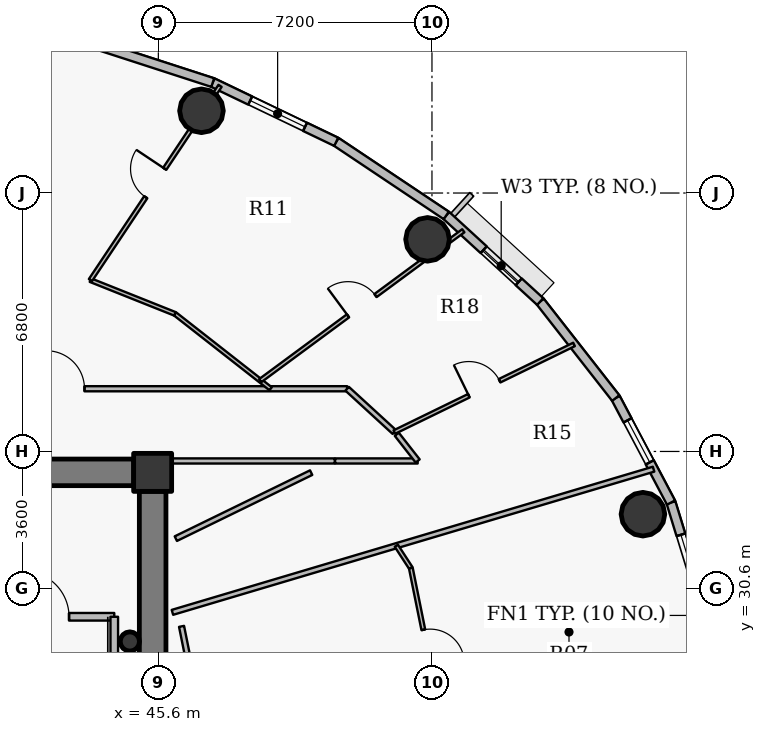
"""IFC4 building model, lengths in metres.
Left out: names, types, materials, properties, quantities, classifications, styles, units other than length and angle.
Written with IfcOpenShell. Run it as: python <this file> out.ifc"""

import sys

from ifc_helpers import new_model, si_unit, direction, frame, frame_2d, origin, origin_2d, place, context, subcontext, project, spatial, rectangle, hollow_circle, extrude, source, transform, mapped, element, fill, save


model = new_model("IFC4")
c1 = context("Model", 3, precision=1e-05, world=origin(), true_north=direction((0.0, 1.0)))
c2 = subcontext(c1, "Body", "Model", "MODEL_VIEW")
j1 = project(units=[si_unit("LENGTHUNIT", "METRE"), si_unit("PLANEANGLEUNIT", "RADIAN")], contexts=[c1])
p1 = place(None, origin())
s1 = spatial("IfcSite", under=j1, at=p1, CompositionType="ELEMENT")
p2 = place(p1, origin())
s2 = spatial("IfcBuilding", under=s1, at=p2, CompositionType="ELEMENT")
p3 = place(p2, frame((0.0, 0.0, 240.3)))
s3 = spatial("IfcBuildingStorey", under=s2, at=p3, CompositionType="ELEMENT", Elevation=240.3)
p4 = place(p3, frame((45.45, 33.65, 0.0), z_axis=(0.0, 0.0, 1.0), x_axis=(1.0, 0.0, 0.0)))
e1 = element("IfcColumn", 1, at=p4, inside=s3, PredefinedType="COLUMN", context=c2, shape_type="SweptSolid", body=[
    extrude(rectangle(XDim=1.0, YDim=1.0, at=origin_2d()), origin(), (0.0, 0.0, 1.0), 3.75),
])
p5 = place(p3, frame((27.05, 33.65, 0.0), z_axis=(0.0, 0.0, 1.0), x_axis=(1.0, 0.0, 0.0)))
e2 = element("IfcWall", 2, at=p5, inside=s3, PredefinedType="SHEAR", context=c2, shape_type="SweptSolid", body=[
    extrude(rectangle(XDim=17.9, YDim=0.7, at=frame_2d((8.95, 0.0))), origin(), (0.0, 0.0, 1.0), 3.05),
])
p6 = place(p5, frame((13.675, 0.0, 0.0)))
e3 = element("IfcOpeningElement", 3, at=p6, cuts=e2, PredefinedType="OPENING", context=c2, shape_type="SweptSolid", body=[
    extrude(rectangle(XDim=1.15, YDim=2.15, at=origin_2d()), frame((0.575, 0.36, 1.075), z_axis=(0.0, -1.0, 0.0), x_axis=(1.0, 0.0, 0.0)), (0.0, 0.0, 1.0), 0.72),
])
p7 = place(p3, frame((45.45, 33.15, 0.0), z_axis=(0.0, 0.0, 1.0), x_axis=(0.0, -1.0, 0.0)))
e4 = element("IfcWall", 4, at=p7, inside=s3, PredefinedType="SHEAR", context=c2, shape_type="SweptSolid", body=[
    extrude(rectangle(XDim=12.3, YDim=0.7, at=frame_2d((6.15, 0.0))), origin(), (0.0, 0.0, 1.0), 3.05),
])
for number, where, z_axis, x_axis in (
    (5, (58.351, 32.549, 0.0), (0.0, 0.0, 1.0), (1.0, 0.0, 0.0)),
    (6, (52.683, 39.781, 0.0), (0.0, 0.0, 1.0), (1.0, 0.0, 0.0)),
    (7, (46.735, 43.164, 0.0), (0.0, 0.0, 1.0), (1.0, 0.0, 0.0)),
):
    element("IfcColumn", number, at=place(p3, frame(where, z_axis=z_axis, x_axis=x_axis)), inside=s3, PredefinedType="COLUMN", context=c2, shape_type="SweptSolid", body=[
        extrude(hollow_circle(Radius=0.575, WallThickness=0.036, at=origin_2d()), origin(), (0.0, 0.0, 1.0), 3.75),
    ])
p8 = place(p3, frame((44.85, 29.2, 0.0), z_axis=(0.0, 0.0, 1.0), x_axis=(1.0, 0.0, 0.0)))
e8 = element("IfcColumn", 8, at=p8, inside=s3, PredefinedType="COLUMN", context=c2, shape_type="SweptSolid", body=[
    extrude(hollow_circle(Radius=0.254, WallThickness=0.02, at=origin_2d()), origin(), (0.0, 0.0, 1.0), 3.75),
])
p9 = place(p3, frame((59.09, 32.856, 0.0), z_axis=(0.0, 0.0, 1.0), x_axis=(0.293132907334, -0.95607170162, 0.0)))
e9 = element("IfcWall", 9, at=p9, inside=s3, PredefinedType="SOLIDWALL", context=c2, shape_type="SweptSolid", body=[
    extrude(rectangle(XDim=3.025, YDim=0.24, at=frame_2d((1.512, 0.0))), origin(), (0.0, 0.0, 1.0), 3.5),
])
p10 = place(p9, frame((0.887, 0.0, 0.9)))
e10 = element("IfcOpeningElement", 10, at=p10, cuts=e9, PredefinedType="OPENING", context=c2, shape_type="SweptSolid", body=[
    extrude(rectangle(XDim=1.25, YDim=1.65, at=origin_2d()), frame((0.625, 0.13, 0.825), z_axis=(0.0, -1.0, 0.0), x_axis=(1.0, 0.0, 0.0)), (0.0, 0.0, 1.0), 0.26),
])
p11 = place(p3, frame((57.636, 35.605, 0.0), z_axis=(0.0, 0.0, 1.0), x_axis=(0.46766049993, -0.883908172157, 0.0)))
e11 = element("IfcWall", 11, at=p11, inside=s3, PredefinedType="SOLIDWALL", context=c2, shape_type="SweptSolid", body=[
    extrude(rectangle(XDim=3.11, YDim=0.24, at=frame_2d((1.555, 0.0))), origin(), (0.0, 0.0, 1.0), 3.5),
])
p12 = place(p11, frame((0.664, 0.0, 0.9)))
e12 = element("IfcOpeningElement", 12, at=p12, cuts=e11, PredefinedType="OPENING", context=c2, shape_type="SweptSolid", body=[
    extrude(rectangle(XDim=1.25, YDim=1.65, at=origin_2d()), frame((0.625, 0.13, 0.825), z_axis=(0.0, -1.0, 0.0), x_axis=(1.0, 0.0, 0.0)), (0.0, 0.0, 1.0), 0.26),
])
p13 = place(p3, frame((55.648, 38.145, 0.0), z_axis=(0.0, 0.0, 1.0), x_axis=(0.616312344705, -0.787501805562, 0.0)))
e13 = element("IfcWall", 13, at=p13, inside=s3, PredefinedType="SOLIDWALL", context=c2, shape_type="SweptSolid", body=[
    extrude(rectangle(XDim=3.225, YDim=0.24, at=frame_2d((1.612, 0.0))), origin(), (0.0, 0.0, 1.0), 3.5),
])
p14 = place(p3, frame((53.176, 40.411, 0.0), z_axis=(0.0, 0.0, 1.0), x_axis=(0.737123922599, -0.675757591694, 0.0)))
e14 = element("IfcWall", 14, at=p14, inside=s3, PredefinedType="SOLIDWALL", context=c2, shape_type="SweptSolid", body=[
    extrude(rectangle(XDim=3.354, YDim=0.24, at=frame_2d((1.677, 0.0))), origin(), (0.0, 0.0, 1.0), 3.5),
])
p15 = place(p14, frame((1.336, 0.0, 0.9)))
e15 = element("IfcOpeningElement", 15, at=p15, cuts=e14, PredefinedType="OPENING", context=c2, shape_type="SweptSolid", body=[
    extrude(rectangle(XDim=1.25, YDim=1.65, at=origin_2d()), frame((0.625, 0.13, 0.825), z_axis=(0.0, -1.0, 0.0), x_axis=(1.0, 0.0, 0.0)), (0.0, 0.0, 1.0), 0.26),
])
p16 = place(p3, frame((50.28, 42.348, 0.0), z_axis=(0.0, 0.0, 1.0), x_axis=(0.831262496074, -0.555880079352, 0.0)))
e16 = element("IfcWall", 16, at=p16, inside=s3, PredefinedType="SOLIDWALL", context=c2, shape_type="SweptSolid", body=[
    extrude(rectangle(XDim=3.484, YDim=0.24, at=frame_2d((1.742, 0.0))), origin(), (0.0, 0.0, 1.0), 3.5),
])
p17 = place(p3, frame((47.031, 43.906, 0.0), z_axis=(0.0, 0.0, 1.0), x_axis=(0.901598104751, -0.432574684313, 0.0)))
e17 = element("IfcWall", 17, at=p17, inside=s3, PredefinedType="SOLIDWALL", context=c2, shape_type="SweptSolid", body=[
    extrude(rectangle(XDim=3.604, YDim=0.24, at=frame_2d((1.802, 0.0))), origin(), (0.0, 0.0, 1.0), 3.5),
])
p18 = place(p17, frame((1.094, 0.0, 0.9)))
e18 = element("IfcOpeningElement", 18, at=p18, cuts=e17, PredefinedType="OPENING", context=c2, shape_type="SweptSolid", body=[
    extrude(rectangle(XDim=1.6, YDim=1.75, at=origin_2d()), frame((0.8, 0.13, 0.875), z_axis=(0.0, -1.0, 0.0), x_axis=(1.0, 0.0, 0.0)), (0.0, 0.0, 1.0), 0.26),
])
p19 = place(p3, frame((43.509, 45.049, 0.0), z_axis=(0.0, 0.0, 1.0), x_axis=(0.951210789182, -0.308541787354, 0.0)))
e19 = element("IfcWall", 19, at=p19, inside=s3, PredefinedType="SOLIDWALL", context=c2, shape_type="SweptSolid", body=[
    extrude(rectangle(XDim=3.702, YDim=0.24, at=frame_2d((1.851, 0.0))), origin(), (0.0, 0.0, 1.0), 3.5),
])
p20 = place(p3, frame((24.35, 35.85, 0.0), z_axis=(0.0, 0.0, 1.0), x_axis=(1.0, 0.0, 0.0)))
e20 = element("IfcWall", 20, at=p20, inside=s3, PredefinedType="PARTITIONING", context=c2, shape_type="SweptSolid", body=[
    extrude(rectangle(XDim=26.218, YDim=0.135, at=frame_2d((13.109, 0.0))), origin(), (0.0, 0.0, 1.0), 2.935),
])
p21 = place(p20, frame((3.172, 0.0, 0.0)))
e21 = element("IfcOpeningElement", 21, at=p21, cuts=e20, PredefinedType="OPENING", context=c2, shape_type="SweptSolid", body=[
    extrude(rectangle(XDim=1.0, YDim=2.15, at=origin_2d()), frame((0.5, 0.078, 1.075), z_axis=(0.0, -1.0, 0.0), x_axis=(1.0, 0.0, 0.0)), (0.0, 0.0, 1.0), 0.155),
])
p22 = place(p20, frame((18.306, 0.0, 0.0)))
e22 = element("IfcOpeningElement", 22, at=p22, cuts=e20, PredefinedType="OPENING", context=c2, shape_type="SweptSolid", body=[
    extrude(rectangle(XDim=1.0, YDim=2.15, at=origin_2d()), frame((0.5, 0.078, 1.075), z_axis=(0.0, -1.0, 0.0), x_axis=(1.0, 0.0, 0.0)), (0.0, 0.0, 1.0), 0.155),
])
p23 = place(p3, frame((35.95, 29.85, 0.0), z_axis=(0.0, 0.0, 1.0), x_axis=(1.0, 0.0, 0.0)))
e23 = element("IfcWall", 23, at=p23, inside=s3, PredefinedType="PARTITIONING", context=c2, shape_type="SweptSolid", body=[
    extrude(rectangle(XDim=8.49, YDim=0.2, at=frame_2d((4.245, 0.0))), origin(), (0.0, 0.0, 1.0), 3.085),
])
p24 = place(p23, frame((6.1, 0.0, 0.0)))
e24 = element("IfcOpeningElement", 24, at=p24, cuts=e23, PredefinedType="OPENING", context=c2, shape_type="SweptSolid", body=[
    extrude(rectangle(XDim=1.2, YDim=2.15, at=origin_2d()), frame((0.6, 0.11, 1.075), z_axis=(0.0, -1.0, 0.0), x_axis=(1.0, 0.0, 0.0)), (0.0, 0.0, 1.0), 0.22),
])
p25 = place(p23, frame((0.37, 0.0, 0.0)))
e25 = element("IfcOpeningElement", 25, at=p25, cuts=e23, PredefinedType="OPENING", context=c2, shape_type="SweptSolid", body=[
    extrude(rectangle(XDim=1.15, YDim=2.15, at=origin_2d()), frame((0.575, 0.11, 1.075), z_axis=(0.0, -1.0, 0.0), x_axis=(1.0, 0.0, 0.0)), (0.0, 0.0, 1.0), 0.22),
])
p26 = place(p23, frame((2.425, 0.0, 0.0)))
e26 = element("IfcOpeningElement", 26, at=p26, cuts=e23, PredefinedType="OPENING", context=c2, shape_type="SweptSolid", body=[
    extrude(rectangle(XDim=1.05, YDim=2.15, at=origin_2d()), frame((0.525, 0.11, 1.075), z_axis=(0.0, -1.0, 0.0), x_axis=(1.0, 0.0, 0.0)), (0.0, 0.0, 1.0), 0.22),
])
p27 = place(p3, frame((43.812, 38.708, 0.0), z_axis=(0.0, 0.0, 1.0), x_axis=(0.928806399166, -0.370565342239, 0.0)))
e27 = element("IfcWall", 27, at=p27, inside=s3, PredefinedType="PARTITIONING", context=c2, shape_type="SweptSolid", body=[
    extrude(rectangle(XDim=2.397, YDim=0.1, at=frame_2d((1.199, 0.0))), origin(), (0.0, 0.0, 1.0), 2.935),
])
p28 = place(p3, frame((43.812, 38.708, 0.0), z_axis=(0.0, 0.0, 1.0), x_axis=(0.555094340213, 0.831787396793, 0.0)))
e28 = element("IfcWall", 28, at=p28, inside=s3, PredefinedType="PARTITIONING", context=c2, shape_type="SweptSolid", body=[
    extrude(rectangle(XDim=6.146, YDim=0.1, at=frame_2d((3.073, 0.0))), origin(), (0.0, 0.0, 1.0), 2.935),
])
p29 = place(p28, frame((2.623, 0.0, 0.0)))
e29 = element("IfcOpeningElement", 29, at=p29, cuts=e28, PredefinedType="OPENING", context=c2, shape_type="SweptSolid", body=[
    extrude(rectangle(XDim=0.9, YDim=2.1, at=origin_2d()), frame((0.45, 0.06, 1.05), z_axis=(0.0, -1.0, 0.0), x_axis=(1.0, 0.0, 0.0)), (0.0, 0.0, 1.0), 0.12),
])
p30 = place(p3, frame((44.44, 21.33, 0.0), z_axis=(0.0, 0.0, 1.0), x_axis=(0.0, 1.0, 0.0)))
e30 = element("IfcWall", 30, at=p30, inside=s3, PredefinedType="PARTITIONING", context=c2, shape_type="SweptSolid", body=[
    extrude(rectangle(XDim=8.52, YDim=0.2, at=frame_2d((4.26, 0.0))), origin(), (0.0, 0.0, 1.0), 3.5),
])
p31 = place(p3, frame((45.97, 29.967, 0.0), z_axis=(0.0, 0.0, 1.0), x_axis=(0.958474934199, 0.285176788174, 0.0)))
e31 = element("IfcWall", 31, at=p31, inside=s3, PredefinedType="PARTITIONING", context=c2, shape_type="SweptSolid", body=[
    extrude(rectangle(XDim=13.21, YDim=0.135, at=frame_2d((6.605, 0.0))), origin(), (0.0, 0.0, 1.0), 2.985),
])
p32 = place(p3, frame((46.039, 37.819, 0.0), z_axis=(0.0, 0.0, 1.0), x_axis=(0.787364681479, -0.616487516791, 0.0)))
e32 = element("IfcWall", 32, at=p32, inside=s3, PredefinedType="PARTITIONING", context=c2, shape_type="SweptSolid", body=[
    extrude(rectangle(XDim=3.195, YDim=0.1, at=frame_2d((1.597, 0.0))), origin(), (0.0, 0.0, 1.0), 2.935),
])
p33 = place(p3, frame((48.281, 36.064, 0.0), z_axis=(0.0, 0.0, 1.0), x_axis=(0.804612975085, 0.593799596097, 0.0)))
e33 = element("IfcWall", 33, at=p33, inside=s3, PredefinedType="PARTITIONING", context=c2, shape_type="SweptSolid", body=[
    extrude(rectangle(XDim=6.64, YDim=0.1, at=frame_2d((3.32, 0.0))), origin(), (0.0, 0.0, 1.0), 2.985),
])
p34 = place(p33, frame((2.87, 0.0, 0.0)))
e34 = element("IfcOpeningElement", 34, at=p34, cuts=e33, PredefinedType="OPENING", context=c2, shape_type="SweptSolid", body=[
    extrude(rectangle(XDim=0.9, YDim=2.1, at=origin_2d()), frame((0.45, 0.06, 1.05), z_axis=(0.0, -1.0, 0.0), x_axis=(1.0, 0.0, 0.0)), (0.0, 0.0, 1.0), 0.12),
])
p35 = place(p3, frame((50.251, 33.95, 0.0), z_axis=(0.0, 0.0, 1.0), x_axis=(1.0, 0.0, 0.0)))
e35 = element("IfcWall", 35, at=p35, inside=s3, PredefinedType="PARTITIONING", context=c2, shape_type="SweptSolid", body=[
    extrude(rectangle(XDim=2.172, YDim=0.135, at=frame_2d((1.086, 0.0))), origin(), (0.0, 0.0, 1.0), 3.5),
])
p36 = place(p3, frame((50.568, 35.85, 0.0), z_axis=(0.0, 0.0, 1.0), x_axis=(0.737130103714, -0.675750849202, 0.0)))
e36 = element("IfcWall", 36, at=p36, inside=s3, PredefinedType="PARTITIONING", context=c2, shape_type="SweptSolid", body=[
    extrude(rectangle(XDim=1.687, YDim=0.135, at=frame_2d((0.843, 0.0))), origin(), (0.0, 0.0, 1.0), 3.5),
])
p37 = place(p3, frame((51.811, 34.71, 0.0), z_axis=(0.0, 0.0, 1.0), x_axis=(0.89880279574, 0.438353207322, 0.0)))
e37 = element("IfcWall", 37, at=p37, inside=s3, PredefinedType="PARTITIONING", context=c2, shape_type="SweptSolid", body=[
    extrude(rectangle(XDim=5.259, YDim=0.1, at=frame_2d((2.63, 0.0))), origin(), (0.0, 0.0, 1.0), 2.985),
])
p38 = place(p37, frame((2.18, 0.0, 0.0)))
e38 = element("IfcOpeningElement", 38, at=p38, cuts=e37, PredefinedType="OPENING", context=c2, shape_type="SweptSolid", body=[
    extrude(rectangle(XDim=0.9, YDim=2.1, at=origin_2d()), frame((0.45, 0.06, 1.05), z_axis=(0.0, -1.0, 0.0), x_axis=(1.0, 0.0, 0.0)), (0.0, 0.0, 1.0), 0.12),
])
p39 = place(p3, frame((51.862, 31.719, 0.0), z_axis=(0.0, 0.0, 1.0), x_axis=(0.545576382868, -0.838061101863, 0.0)))
e39 = element("IfcWall", 39, at=p39, inside=s3, PredefinedType="PARTITIONING", context=c2, shape_type="SweptSolid", body=[
    extrude(rectangle(XDim=0.7, YDim=0.1, at=frame_2d((0.35, 0.0))), origin(), (0.0, 0.0, 1.0), 2.935),
])
p40 = place(p3, frame((51.874, 34.653, 0.0), z_axis=(0.0, 0.0, 1.0), x_axis=(0.61628613448, -0.787522317429, 0.0)))
e40 = element("IfcWall", 40, at=p40, inside=s3, PredefinedType="PARTITIONING", context=c2, shape_type="SweptSolid", body=[
    extrude(rectangle(XDim=0.893, YDim=0.135, at=frame_2d((0.446, 0.0))), origin(), (0.0, 0.0, 1.0), 3.5),
])
p41 = place(p3, frame((52.244, 31.133, 0.0), z_axis=(0.0, 0.0, 1.0), x_axis=(0.198264809747, -0.980148491411, 0.0)))
e41 = element("IfcWall", 41, at=p41, inside=s3, PredefinedType="PARTITIONING", context=c2, shape_type="SweptSolid", body=[
    extrude(rectangle(XDim=4.216, YDim=0.1, at=frame_2d((2.108, 0.0))), origin(), (0.0, 0.0, 1.0), 2.935),
])
p42 = place(p41, frame((1.658, 0.0, 0.0)))
e42 = element("IfcOpeningElement", 42, at=p42, cuts=e41, PredefinedType="OPENING", context=c2, shape_type="SweptSolid", body=[
    extrude(rectangle(XDim=0.9, YDim=2.1, at=origin_2d()), frame((0.45, 0.06, 1.05), z_axis=(0.0, -1.0, 0.0), x_axis=(1.0, 0.0, 0.0)), (0.0, 0.0, 1.0), 0.12),
])
p43 = place(p3, frame((50.241, 33.95, 0.0), z_axis=(0.0, 0.0, 1.0), x_axis=(-1.0, 0.0, 0.0)))
e43 = element("IfcWall", 43, at=p43, inside=s3, PredefinedType="PARTITIONING", context=c2, shape_type="SweptSolid", body=[
    extrude(rectangle(XDim=4.441, YDim=0.135, at=frame_2d((2.221, 0.0))), origin(), (0.0, 0.0, 1.0), 3.5),
])
p44 = place(p3, frame((45.79, 34.0, 0.0), z_axis=(0.0, 0.0, 1.0), x_axis=(-1.0, 0.0, 0.0)))
e44 = element("IfcWall", 44, at=p44, inside=s3, PredefinedType="PARTITIONING", context=c2, shape_type="SweptSolid", body=[
    extrude(rectangle(XDim=0.83, YDim=0.135, at=frame_2d((0.415, 0.0))), origin(), (0.0, 0.0, 1.0), 2.935),
])
p45 = place(p3, frame((46.736, 27.0, 0.0), z_axis=(0.0, 0.0, 1.0), x_axis=(-0.198330009585, 0.980135300506, 0.0)))
e45 = element("IfcWall", 45, at=p45, inside=s3, PredefinedType="PARTITIONING", context=c2, shape_type="SweptSolid", body=[
    extrude(rectangle(XDim=2.65, YDim=0.135, at=frame_2d((1.325, 0.0))), origin(), (0.0, 0.0, 1.0), 2.935),
])
p46 = place(p3, frame((46.06, 31.906, 0.0), z_axis=(0.0, 0.0, 1.0), x_axis=(0.898819963923, 0.438318003797, 0.0)))
e46 = element("IfcWall", 46, at=p46, inside=s3, PredefinedType="PARTITIONING", context=c2, shape_type="SweptSolid", body=[
    extrude(rectangle(XDim=3.962, YDim=0.135, at=frame_2d((1.981, 0.0))), origin(), (0.0, 0.0, 1.0), 3.5),
])
m1 = source(origin(), c2, "Body", "SweptSolid", [
    extrude(rectangle(XDim=1.25, YDim=1.65, at=origin_2d()), frame((0.625, 0.03, 0.825), z_axis=(0.0, -1.0, 0.0), x_axis=(1.0, 0.0, 0.0)), (0.0, 0.0, 1.0), 0.06),
])
p47 = place(p15, origin())
e47 = element("IfcWindow", 47, at=p47, inside=s3, PartitioningType="SINGLE_PANEL", PredefinedType="WINDOW", context=c2, shape_type="MappedRepresentation", body=[
    mapped(m1, transform((0.0, 0.0, 0.0), x_axis=(1.0, 0.0, 0.0), y_axis=(0.0, 1.0, 0.0), z_axis=(0.0, 0.0, 1.0), scale=1.0)),
])
fill(e15, e47)
m2 = source(origin(), c2, "Body", "SweptSolid", [
    extrude(rectangle(XDim=1.6, YDim=1.75, at=origin_2d()), frame((0.8, 0.03, 0.875), z_axis=(0.0, -1.0, 0.0), x_axis=(1.0, 0.0, 0.0)), (0.0, 0.0, 1.0), 0.06),
])
p48 = place(p18, origin())
e48 = element("IfcWindow", 48, at=p48, inside=s3, PartitioningType="DOUBLE_PANEL_VERTICAL", PredefinedType="WINDOW", context=c2, shape_type="MappedRepresentation", body=[
    mapped(m2, transform((0.0, 0.0, 0.0), x_axis=(1.0, 0.0, 0.0), y_axis=(0.0, 1.0, 0.0), z_axis=(0.0, 0.0, 1.0), scale=1.0)),
])
fill(e18, e48)
p49 = place(p10, origin())
e49 = element("IfcWindow", 49, at=p49, inside=s3, PartitioningType="SINGLE_PANEL", PredefinedType="WINDOW", context=c2, shape_type="MappedRepresentation", body=[
    mapped(m1, transform((0.0, 0.0, 0.0), x_axis=(1.0, 0.0, 0.0), y_axis=(0.0, 1.0, 0.0), z_axis=(0.0, 0.0, 1.0), scale=1.0)),
])
fill(e10, e49)
p50 = place(p12, origin())
e50 = element("IfcWindow", 50, at=p50, inside=s3, PartitioningType="SINGLE_PANEL", PredefinedType="WINDOW", context=c2, shape_type="MappedRepresentation", body=[
    mapped(m1, transform((0.0, 0.0, 0.0), x_axis=(1.0, 0.0, 0.0), y_axis=(0.0, 1.0, 0.0), z_axis=(0.0, 0.0, 1.0), scale=1.0)),
])
fill(e12, e50)
m3 = source(origin(), c2, "Body", "SweptSolid", [
    extrude(rectangle(XDim=1.2, YDim=2.15, at=origin_2d()), frame((0.6, 0.025, 1.075), z_axis=(0.0, -1.0, 0.0), x_axis=(1.0, 0.0, 0.0)), (0.0, 0.0, 1.0), 0.05),
])
p51 = place(p24, origin())
e51 = element("IfcDoor", 51, at=p51, inside=s3, OperationType="SINGLE_SWING_LEFT", PredefinedType="DOOR", context=c2, shape_type="MappedRepresentation", body=[
    mapped(m3, transform((0.0, 0.0, 0.0), x_axis=(1.0, 0.0, 0.0), y_axis=(0.0, 1.0, 0.0), z_axis=(0.0, 0.0, 1.0), scale=1.0)),
])
fill(e24, e51)
m4 = source(origin(), c2, "Body", "SweptSolid", [
    extrude(rectangle(XDim=0.9, YDim=2.1, at=origin_2d()), frame((0.45, 0.025, 1.05), z_axis=(0.0, -1.0, 0.0), x_axis=(1.0, 0.0, 0.0)), (0.0, 0.0, 1.0), 0.05),
])
p52 = place(p42, origin())
e52 = element("IfcDoor", 52, at=p52, inside=s3, OperationType="SINGLE_SWING_RIGHT", PredefinedType="DOOR", context=c2, shape_type="MappedRepresentation", body=[
    mapped(m4, transform((0.0, 0.0, 0.0), x_axis=(1.0, 0.0, 0.0), y_axis=(0.0, 1.0, 0.0), z_axis=(0.0, 0.0, 1.0), scale=1.0)),
])
fill(e42, e52)
m5 = source(origin(), c2, "Body", "SweptSolid", [
    extrude(rectangle(XDim=1.0, YDim=2.15, at=origin_2d()), frame((0.5, 0.025, 1.075), z_axis=(0.0, -1.0, 0.0), x_axis=(1.0, 0.0, 0.0)), (0.0, 0.0, 1.0), 0.05),
])
p53 = place(p22, origin())
e53 = element("IfcDoor", 53, at=p53, inside=s3, OperationType="SINGLE_SWING_LEFT", PredefinedType="DOOR", context=c2, shape_type="MappedRepresentation", body=[
    mapped(m5, transform((0.0, 0.0, 0.0), x_axis=(1.0, 0.0, 0.0), y_axis=(0.0, 1.0, 0.0), z_axis=(0.0, 0.0, 1.0), scale=1.0)),
])
fill(e22, e53)
p54 = place(p29, origin())
e54 = element("IfcDoor", 54, at=p54, inside=s3, OperationType="SINGLE_SWING_RIGHT", PredefinedType="DOOR", context=c2, shape_type="MappedRepresentation", body=[
    mapped(m4, transform((0.0, 0.0, 0.0), x_axis=(1.0, 0.0, 0.0), y_axis=(0.0, 1.0, 0.0), z_axis=(0.0, 0.0, 1.0), scale=1.0)),
])
fill(e29, e54)
p55 = place(p34, origin())
e55 = element("IfcDoor", 55, at=p55, inside=s3, OperationType="SINGLE_SWING_LEFT", PredefinedType="DOOR", context=c2, shape_type="MappedRepresentation", body=[
    mapped(m4, transform((0.0, 0.0, 0.0), x_axis=(1.0, 0.0, 0.0), y_axis=(0.0, 1.0, 0.0), z_axis=(0.0, 0.0, 1.0), scale=1.0)),
])
fill(e34, e55)
p56 = place(p38, origin())
e56 = element("IfcDoor", 56, at=p56, inside=s3, OperationType="SINGLE_SWING_LEFT", PredefinedType="DOOR", context=c2, shape_type="MappedRepresentation", body=[
    mapped(m4, transform((0.0, 0.0, 0.0), x_axis=(1.0, 0.0, 0.0), y_axis=(0.0, 1.0, 0.0), z_axis=(0.0, 0.0, 1.0), scale=1.0)),
])
fill(e38, e56)
save(model, sys.argv[1])
